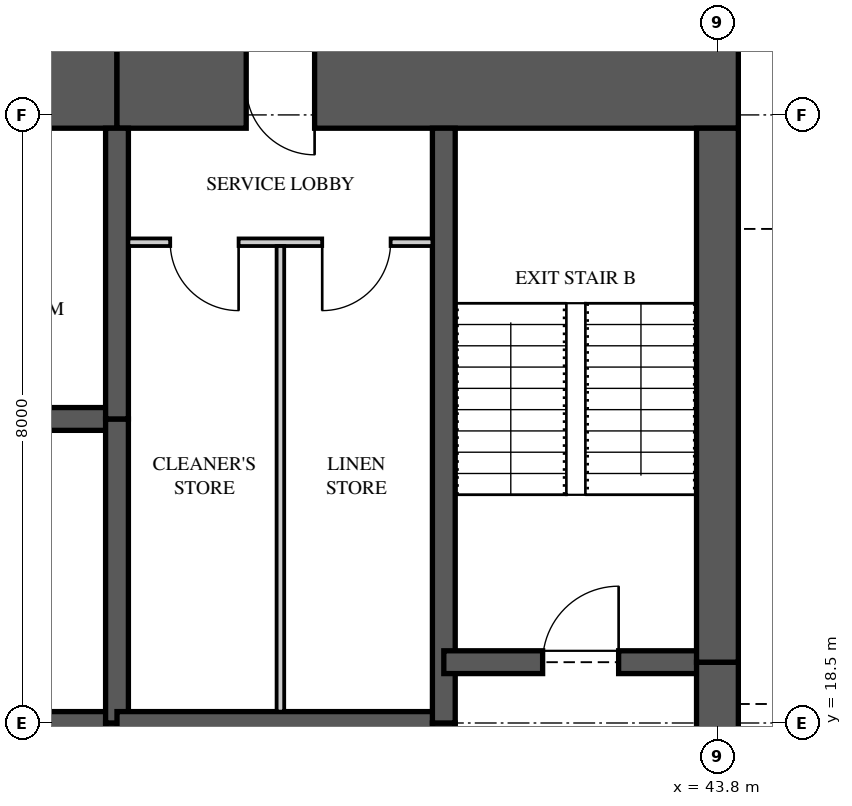
"""IFC4 building model, lengths in metres.
Left out: names, types, materials, properties, quantities, classifications, styles, units other than length and angle.
Written with IfcOpenShell. Run it as: python <this file> out.ifc"""

import sys

from ifc_helpers import new_model, si_unit, direction, frame, frame_2d, origin, place, context, subcontext, project, spatial, rectangle, extrude, element, fill, save


model = new_model("IFC4")
c1 = context("Model", 3, precision=1e-05, world=origin(), true_north=direction((0.0, 1.0)))
c2 = subcontext(c1, "Body", "Model", "MODEL_VIEW")
j1 = project(units=[si_unit("LENGTHUNIT", "METRE"), si_unit("PLANEANGLEUNIT", "RADIAN")], contexts=[c1])
p1 = place(None, origin())
s1 = spatial("IfcSite", under=j1, at=p1, CompositionType="ELEMENT")
p2 = place(p1, origin())
s2 = spatial("IfcBuilding", under=s1, at=p2, CompositionType="ELEMENT")
p3 = place(p2, frame((0.0, 0.0, 224.95)))
s3 = spatial("IfcBuildingStorey", under=s2, at=p3, CompositionType="ELEMENT", Elevation=224.95)
p4 = place(p3, frame((44.075, 26.875, 0.0), z_axis=(0.0, 0.0, 1.0), x_axis=(-1.0, 0.0, 0.0)))
e1 = element("IfcWall", 1, at=p4, inside=s3, PredefinedType="SHEAR", context=c2, shape_type="SweptSolid", body=[
    extrude(rectangle(XDim=8.175, YDim=1.1, at=frame_2d((4.087, 0.0))), origin(), (0.0, 0.0, 1.0), 3.5),
])
p5 = place(p4, frame((5.575, 0.0, 0.0)))
e2 = element("IfcOpeningElement", 2, at=p5, cuts=e1, PredefinedType="OPENING", context=c2, shape_type="SweptSolid", body=[
    extrude(rectangle(XDim=0.9, YDim=2.1, at=frame_2d((0.45, 1.05))), frame((0.0, 0.56, 0.0), z_axis=(0.0, -1.0, 0.0), x_axis=(1.0, 0.0, 0.0)), (0.0, 0.0, 1.0), 1.12),
])
p6 = place(p3, frame((35.9, 26.875, 0.0), z_axis=(0.0, 0.0, 1.0), x_axis=(-1.0, 0.0, 0.0)))
e3 = element("IfcWall", 3, at=p6, inside=s3, PredefinedType="SHEAR", context=c2, shape_type="SweptSolid", body=[
    extrude(rectangle(XDim=4.3, YDim=1.1, at=frame_2d((2.15, 0.0))), origin(), (0.0, 0.0, 1.0), 3.5),
])
p7 = place(p3, frame((43.8, 13.0, 0.0), z_axis=(0.0, 0.0, 1.0), x_axis=(0.0, 1.0, 0.0)))
e4 = element("IfcWall", 4, at=p7, inside=s3, PredefinedType="SHEAR", context=c2, shape_type="SweptSolid", body=[
    extrude(rectangle(XDim=6.3, YDim=0.55, at=frame_2d((3.15, 0.0))), origin(), (0.0, 0.0, 1.0), 3.5),
])
p8 = place(p7, frame((4.1, 0.0, 0.0)))
e5 = element("IfcOpeningElement", 5, at=p8, cuts=e4, PredefinedType="OPENING", context=c2, shape_type="SweptSolid", body=[
    extrude(rectangle(XDim=1.2, YDim=2.2, at=frame_2d((0.6, 1.1))), frame((0.0, 0.285, 0.0), z_axis=(0.0, -1.0, 0.0), x_axis=(1.0, 0.0, 0.0)), (0.0, 0.0, 1.0), 0.57),
])
p9 = place(p3, frame((43.8, 19.3, 0.0), z_axis=(0.0, 0.0, 1.0), x_axis=(0.0, 1.0, 0.0)))
e6 = element("IfcWall", 6, at=p9, inside=s3, PredefinedType="SHEAR", context=c2, shape_type="SweptSolid", body=[
    extrude(rectangle(XDim=7.025, YDim=0.55, at=frame_2d((3.512, 0.0))), origin(), (0.0, 0.0, 1.0), 3.5),
])
for number, where, z_axis, x_axis in (
    (7, (35.9, 14.5, 0.0), (0.0, 0.0, 1.0), (0.0, 1.0, 0.0)),
    (8, (35.9, 18.5, 0.0), (0.0, 0.0, 1.0), (0.0, 1.0, 0.0)),
):
    element("IfcWall", number, at=place(p3, frame(where, z_axis=z_axis, x_axis=x_axis)), inside=s3, PredefinedType="SHEAR", context=c2, shape_type="SweptSolid", body=[
        extrude(rectangle(XDim=4.0, YDim=0.3, at=frame_2d((2.0, 0.0))), origin(), (0.0, 0.0, 1.0), 3.5),
    ])
p10 = place(p3, frame((35.9, 22.5, 0.0), z_axis=(0.0, 0.0, 1.0), x_axis=(0.0, 1.0, 0.0)))
e9 = element("IfcWall", 9, at=p10, inside=s3, PredefinedType="SHEAR", context=c2, shape_type="SweptSolid", body=[
    extrude(rectangle(XDim=3.825, YDim=0.3, at=frame_2d((1.913, 0.0))), origin(), (0.0, 0.0, 1.0), 3.5),
])
p11 = place(p3, frame((40.2, 13.7, 0.0), z_axis=(0.0, 0.0, 1.0), x_axis=(0.0, 1.0, 0.0)))
e10 = element("IfcWall", 10, at=p11, inside=s3, PredefinedType="SHEAR", context=c2, shape_type="SweptSolid", body=[
    extrude(rectangle(XDim=4.8, YDim=0.3, at=frame_2d((2.4, 0.0))), origin(), (0.0, 0.0, 1.0), 3.5),
])
p12 = place(p3, frame((40.2, 18.5, 0.0), z_axis=(0.0, 0.0, 1.0), x_axis=(0.0, 1.0, 0.0)))
e11 = element("IfcWall", 11, at=p12, inside=s3, PredefinedType="SHEAR", context=c2, shape_type="SweptSolid", body=[
    extrude(rectangle(XDim=7.825, YDim=0.3, at=frame_2d((3.913, 0.0))), origin(), (0.0, 0.0, 1.0), 3.5),
])
for number, where, z_axis, x_axis in (
    (12, (31.6, 18.5, 0.0), (0.0, 0.0, 1.0), (1.0, 0.0, 0.0)),
    (13, (31.6, 22.5, 0.0), (0.0, 0.0, 1.0), (1.0, 0.0, 0.0)),
):
    element("IfcWall", number, at=place(p3, frame(where, z_axis=z_axis, x_axis=x_axis)), inside=s3, PredefinedType="SHEAR", context=c2, shape_type="SweptSolid", body=[
        extrude(rectangle(XDim=4.3, YDim=0.3, at=frame_2d((2.15, 0.0))), origin(), (0.0, 0.0, 1.0), 3.5),
    ])
p13 = place(p3, frame((35.9, 18.5, 0.0), z_axis=(0.0, 0.0, 1.0), x_axis=(1.0, 0.0, 0.0)))
e14 = element("IfcWall", 14, at=p13, inside=s3, PredefinedType="SHEAR", context=c2, shape_type="SweptSolid", body=[
    extrude(rectangle(XDim=4.3, YDim=0.3, at=frame_2d((2.15, 0.0))), origin(), (0.0, 0.0, 1.0), 3.5),
])
p14 = place(p3, frame((40.2, 19.3, 0.0), z_axis=(0.0, 0.0, 1.0), x_axis=(1.0, 0.0, 0.0)))
e15 = element("IfcWall", 15, at=p14, inside=s3, PredefinedType="SHEAR", context=c2, shape_type="SweptSolid", body=[
    extrude(rectangle(XDim=3.6, YDim=0.3, at=frame_2d((1.8, 0.0))), origin(), (0.0, 0.0, 1.0), 3.5),
])
p15 = place(p14, frame((1.3, 0.0, 0.0)))
e16 = element("IfcOpeningElement", 16, at=p15, cuts=e15, PredefinedType="OPENING", context=c2, shape_type="SweptSolid", body=[
    extrude(rectangle(XDim=1.0, YDim=2.1, at=frame_2d((0.5, 1.05))), frame((0.0, 0.16, 0.0), z_axis=(0.0, -1.0, 0.0), x_axis=(1.0, 0.0, 0.0)), (0.0, 0.0, 1.0), 0.32),
])
p16 = place(p3, frame((36.05, 24.825, 0.0), z_axis=(0.0, 0.0, 1.0), x_axis=(1.0, 0.0, 0.0)))
e17 = element("IfcWall", 17, at=p16, inside=s3, PredefinedType="PARTITIONING", context=c2, shape_type="SweptSolid", body=[
    extrude(rectangle(XDim=4.0, YDim=0.1, at=frame_2d((2.0, 0.0))), origin(), (0.0, 0.0, 1.0), 3.26),
])
p17 = place(p16, frame((0.55, 0.0, 0.0)))
e18 = element("IfcOpeningElement", 18, at=p17, cuts=e17, PredefinedType="OPENING", context=c2, shape_type="SweptSolid", body=[
    extrude(rectangle(XDim=0.9, YDim=2.1, at=frame_2d((0.45, 1.05))), frame((0.0, 0.06, 0.0), z_axis=(0.0, -1.0, 0.0), x_axis=(1.0, 0.0, 0.0)), (0.0, 0.0, 1.0), 0.12),
])
p18 = place(p16, frame((2.55, 0.0, 0.0)))
e19 = element("IfcOpeningElement", 19, at=p18, cuts=e17, PredefinedType="OPENING", context=c2, shape_type="SweptSolid", body=[
    extrude(rectangle(XDim=0.9, YDim=2.1, at=frame_2d((0.45, 1.05))), frame((0.0, 0.06, 0.0), z_axis=(0.0, -1.0, 0.0), x_axis=(1.0, 0.0, 0.0)), (0.0, 0.0, 1.0), 0.12),
])
p19 = place(p3, frame((38.05, 18.65, 0.0), z_axis=(0.0, 0.0, 1.0), x_axis=(0.0, 1.0, 0.0)))
e20 = element("IfcWall", 20, at=p19, inside=s3, PredefinedType="PARTITIONING", context=c2, shape_type="SweptSolid", body=[
    extrude(rectangle(XDim=6.125, YDim=0.1, at=frame_2d((3.062, 0.0))), origin(), (0.0, 0.0, 1.0), 3.26),
])
p20 = place(p17, frame((0.9, 0.0, 0.0), z_axis=(0.0, 0.0, 1.0), x_axis=(-1.0, 0.0, 0.0)))
e21 = element("IfcDoor", 21, at=p20, inside=s3, OperationType="SINGLE_SWING_LEFT", PredefinedType="DOOR", context=c2, shape_type="SweptSolid", body=[
    extrude(rectangle(XDim=0.9, YDim=2.1, at=frame_2d((0.45, 1.05))), frame((0.0, 0.025, 0.0), z_axis=(0.0, -1.0, 0.0), x_axis=(1.0, 0.0, 0.0)), (0.0, 0.0, 1.0), 0.05),
])
fill(e18, e21)
p21 = place(p18, frame((0.9, 0.0, 0.0), z_axis=(0.0, 0.0, 1.0), x_axis=(-1.0, 0.0, 0.0)))
e22 = element("IfcDoor", 22, at=p21, inside=s3, OperationType="SINGLE_SWING_RIGHT", PredefinedType="DOOR", context=c2, shape_type="SweptSolid", body=[
    extrude(rectangle(XDim=0.9, YDim=2.1, at=frame_2d((0.45, 1.05))), frame((0.0, 0.025, 0.0), z_axis=(0.0, -1.0, 0.0), x_axis=(1.0, 0.0, 0.0)), (0.0, 0.0, 1.0), 0.05),
])
fill(e19, e22)
p22 = place(p15, origin())
e23 = element("IfcDoor", 23, at=p22, inside=s3, OperationType="SINGLE_SWING_RIGHT", PredefinedType="DOOR", context=c2, shape_type="SweptSolid", body=[
    extrude(rectangle(XDim=1.0, YDim=2.1, at=frame_2d((0.5, 1.05))), frame((0.0, 0.025, 0.0), z_axis=(0.0, -1.0, 0.0), x_axis=(1.0, 0.0, 0.0)), (0.0, 0.0, 1.0), 0.05),
])
fill(e16, e23)
p23 = place(p5, origin())
e24 = element("IfcDoor", 24, at=p23, inside=s3, OperationType="SINGLE_SWING_LEFT", PredefinedType="DOOR", context=c2, shape_type="SweptSolid", body=[
    extrude(rectangle(XDim=0.9, YDim=2.1, at=frame_2d((0.45, 1.05))), frame((0.0, 0.47, 0.0), z_axis=(0.0, -1.0, 0.0), x_axis=(1.0, 0.0, 0.0)), (0.0, 0.0, 1.0), 0.8),
])
fill(e2, e24)
save(model, sys.argv[1])
